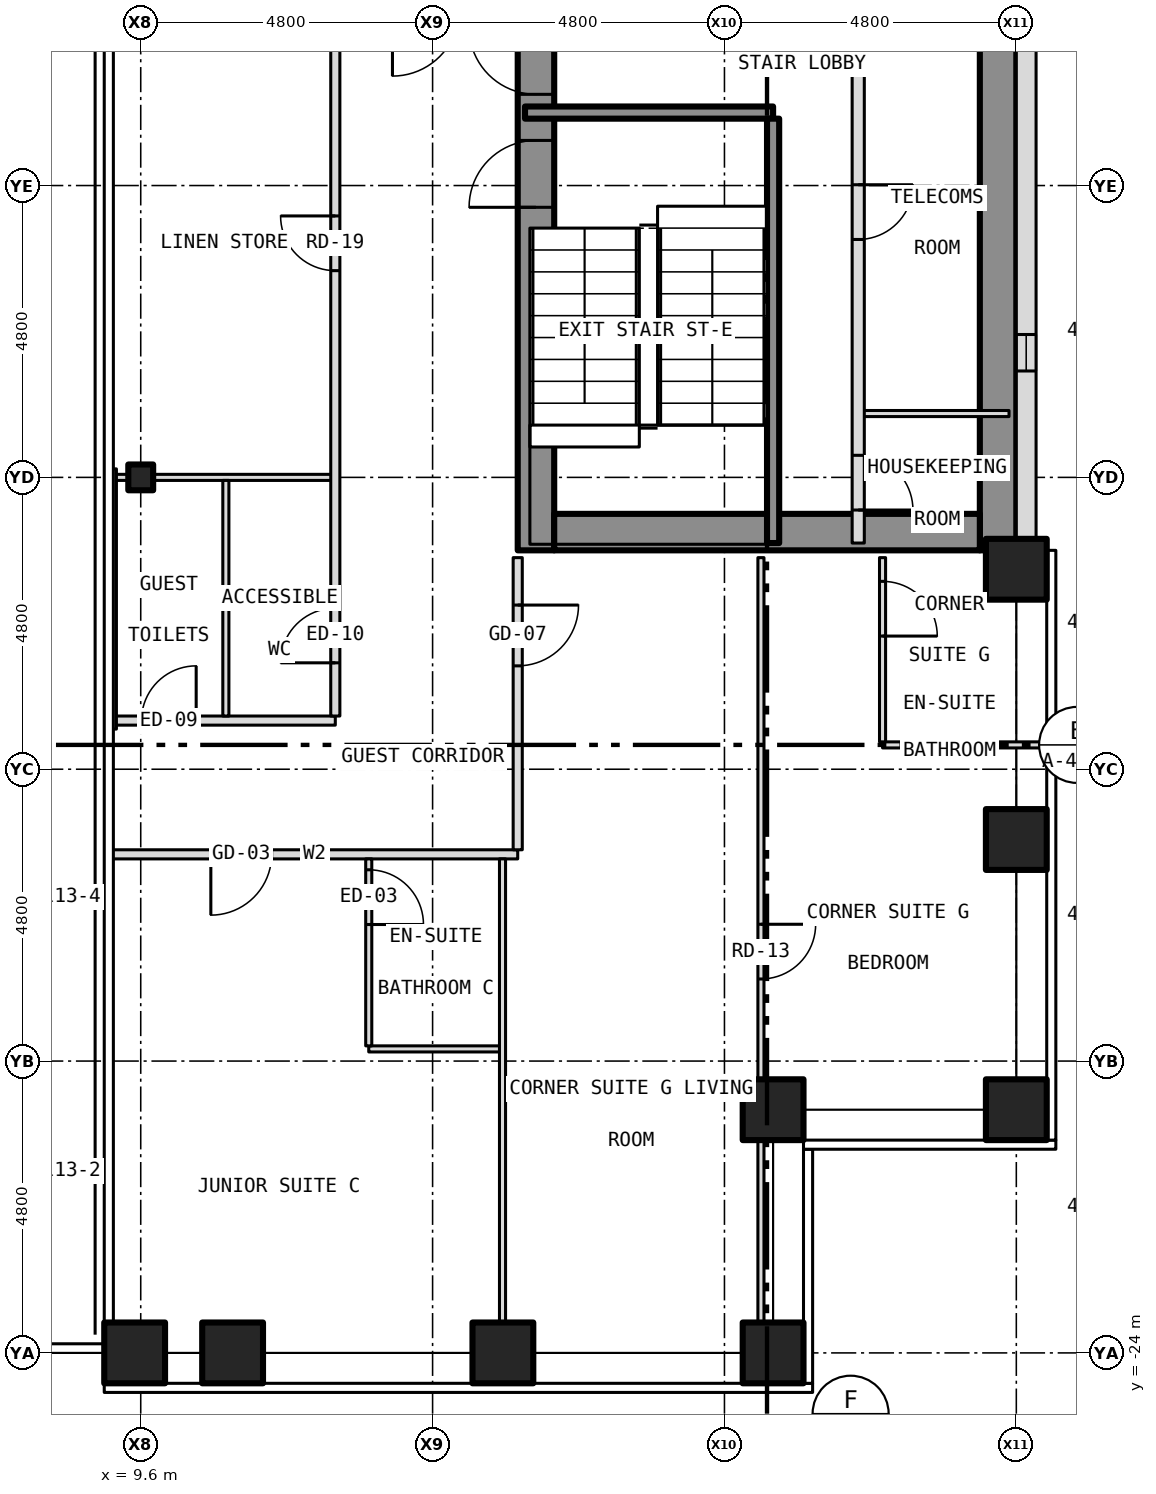
"""IFC4 building model, lengths in metres.
Left out: names, types, materials, properties, quantities, classifications, styles, units other than length and angle.
Written with IfcOpenShell. Run it as: python <this file> out.ifc"""

import sys

from ifc_helpers import new_model, si_unit, direction, frame, frame_2d, origin, origin_2d, place, context, subcontext, project, spatial, rectangle, hollow_rectangle, i_section, extrude, element, fill, save


model = new_model("IFC4")
c1 = context("Model", 3, precision=1e-05, world=origin(), true_north=direction((0.0, 1.0)))
c2 = subcontext(c1, "Body", "Model", "MODEL_VIEW")
j1 = project(units=[si_unit("LENGTHUNIT", "METRE"), si_unit("PLANEANGLEUNIT", "RADIAN")], contexts=[c1])
p1 = place(None, origin())
s1 = spatial("IfcSite", under=j1, at=p1, CompositionType="ELEMENT")
p2 = place(p1, origin())
s2 = spatial("IfcBuilding", under=s1, at=p2, CompositionType="ELEMENT")
p3 = place(p2, frame((0.0, 0.0, 60.0)))
s3 = spatial("IfcBuildingStorey", under=s2, at=p3, CompositionType="ELEMENT", Elevation=60.0)
for number, where, z_axis, x_axis in (
    (1, (11.111, -24.0, -0.15), (0.0, 0.0, 1.0), (1.0, 0.0, 0.0)),
    (2, (15.556, -24.0, -0.15), (0.0, 0.0, 1.0), (1.0, 0.0, 0.0)),
    (3, (20.0, -24.0, -0.15), (0.0, 0.0, 1.0), (1.0, 0.0, 0.0)),
    (4, (24.0, -20.0, -0.15), (0.0, 0.0, 1.0), (1.0, 0.0, 0.0)),
    (5, (24.0, -15.556, -0.15), (0.0, 0.0, 1.0), (1.0, 0.0, 0.0)),
    (6, (24.0, -11.111, -0.15), (0.0, 0.0, 1.0), (1.0, 0.0, 0.0)),
    (7, (20.0, -20.0, -0.15), (0.0, 0.0, 1.0), (1.0, 0.0, 0.0)),
    (8, (9.5, -24.0, -0.15), (0.0, 0.0, 1.0), (1.0, 0.0, 0.0)),
):
    element("IfcColumn", number, at=place(p3, frame(where, z_axis=z_axis, x_axis=x_axis)), inside=s3, PredefinedType="COLUMN", context=c2, shape_type="SweptSolid", body=[
        extrude(hollow_rectangle(XDim=1.0, YDim=1.0, WallThickness=0.06, at=origin_2d()), origin(), (0.0, 0.0, 1.0), 3.5),
    ])
p4 = place(p3, frame((9.6, -9.6, -0.15), z_axis=(0.0, 0.0, 1.0), x_axis=(1.0, 0.0, 0.0)))
e9 = element("IfcColumn", 9, at=p4, inside=s3, PredefinedType="COLUMN", context=c2, shape_type="SweptSolid", body=[
    extrude(i_section(OverallWidth=0.409, OverallDepth=0.424, WebThickness=0.033, FlangeThickness=0.052, at=origin_2d()), origin(), (0.0, 0.0, 1.0), 3.5),
])
p5 = place(p3, frame((16.1, -10.8, 0.0), z_axis=(0.0, 0.0, 1.0), x_axis=(0.0, 1.0, 0.0)))
e10 = element("IfcWall", 10, at=p5, inside=s3, PredefinedType="SHEAR", context=c2, shape_type="SweptSolid", body=[
    extrude(rectangle(XDim=21.6, YDim=0.6, at=frame_2d((10.8, 0.0))), origin(), (0.0, 0.0, 1.0), 3.25),
])
p6 = place(p5, frame((9.4, 0.0, 0.0)))
e11 = element("IfcOpeningElement", 11, at=p6, cuts=e10, PredefinedType="OPENING", context=c2, shape_type="SweptSolid", body=[
    extrude(rectangle(XDim=1.1, YDim=2.1, at=frame_2d((0.55, 1.05))), frame((0.0, 0.312, 0.0), z_axis=(0.0, -1.0, 0.0), x_axis=(1.0, 0.0, 0.0)), (0.0, 0.0, 1.0), 0.624),
])
p7 = place(p5, frame((11.5, 0.0, 0.0)))
e12 = element("IfcOpeningElement", 12, at=p7, cuts=e10, PredefinedType="OPENING", context=c2, shape_type="SweptSolid", body=[
    extrude(rectangle(XDim=1.1, YDim=2.1, at=frame_2d((0.55, 1.05))), frame((0.0, 0.312, 0.0), z_axis=(0.0, -1.0, 0.0), x_axis=(1.0, 0.0, 0.0)), (0.0, 0.0, 1.0), 0.624),
])
p8 = place(p5, frame((13.6, 0.0, 0.0)))
e13 = element("IfcOpeningElement", 13, at=p8, cuts=e10, PredefinedType="OPENING", context=c2, shape_type="SweptSolid", body=[
    extrude(rectangle(XDim=1.1, YDim=2.1, at=frame_2d((0.55, 1.05))), frame((0.0, 0.312, 0.0), z_axis=(0.0, -1.0, 0.0), x_axis=(1.0, 0.0, 0.0)), (0.0, 0.0, 1.0), 0.624),
])
p9 = place(p5, frame((15.7, 0.0, 0.0)))
e14 = element("IfcOpeningElement", 14, at=p9, cuts=e10, PredefinedType="OPENING", context=c2, shape_type="SweptSolid", body=[
    extrude(rectangle(XDim=1.1, YDim=2.1, at=frame_2d((0.55, 1.05))), frame((0.0, 0.312, 0.0), z_axis=(0.0, -1.0, 0.0), x_axis=(1.0, 0.0, 0.0)), (0.0, 0.0, 1.0), 0.624),
])
p10 = place(p5, frame((17.8, 0.0, 0.0)))
e15 = element("IfcOpeningElement", 15, at=p10, cuts=e10, PredefinedType="OPENING", context=c2, shape_type="SweptSolid", body=[
    extrude(rectangle(XDim=1.1, YDim=2.1, at=frame_2d((0.55, 1.05))), frame((0.0, 0.312, 0.0), z_axis=(0.0, -1.0, 0.0), x_axis=(1.0, 0.0, 0.0)), (0.0, 0.0, 1.0), 0.624),
])
p11 = place(p5, frame((5.642, 0.0, 0.0)))
e16 = element("IfcOpeningElement", 16, at=p11, cuts=e10, PredefinedType="OPENING", context=c2, shape_type="SweptSolid", body=[
    extrude(rectangle(XDim=1.1, YDim=2.1, at=frame_2d((0.55, 1.05))), frame((0.0, 0.312, 0.0), z_axis=(0.0, -1.0, 0.0), x_axis=(1.0, 0.0, 0.0)), (0.0, 0.0, 1.0), 0.624),
])
p12 = place(p5, frame((7.5, 0.0, 0.0)))
e17 = element("IfcOpeningElement", 17, at=p12, cuts=e10, PredefinedType="OPENING", context=c2, shape_type="SweptSolid", body=[
    extrude(rectangle(XDim=1.1, YDim=2.1, at=frame_2d((0.55, 1.05))), frame((0.0, 0.312, 0.0), z_axis=(0.0, -1.0, 0.0), x_axis=(1.0, 0.0, 0.0)), (0.0, 0.0, 1.0), 0.624),
])
p13 = place(p3, frame((23.7, -10.8, 0.0), z_axis=(0.0, 0.0, 1.0), x_axis=(0.0, 1.0, 0.0)))
e18 = element("IfcWall", 18, at=p13, inside=s3, PredefinedType="SHEAR", context=c2, shape_type="SweptSolid", body=[
    extrude(rectangle(XDim=21.6, YDim=0.6, at=frame_2d((10.8, 0.0))), origin(), (0.0, 0.0, 1.0), 3.25),
])
p14 = place(p3, frame((16.4, -10.5, 0.0), z_axis=(0.0, 0.0, 1.0), x_axis=(1.0, 0.0, 0.0)))
e19 = element("IfcWall", 19, at=p14, inside=s3, PredefinedType="SHEAR", context=c2, shape_type="SweptSolid", body=[
    extrude(rectangle(XDim=7.0, YDim=0.6, at=frame_2d((3.5, 0.0))), origin(), (0.0, 0.0, 1.0), 3.25),
])
p15 = place(p3, frame((24.163, -10.8, 0.0), z_axis=(0.0, 0.0, 1.0), x_axis=(0.0, 1.0, 0.0)))
e20 = element("IfcWall", 20, at=p15, inside=s3, PredefinedType="SOLIDWALL", context=c2, shape_type="SweptSolid", body=[
    extrude(rectangle(XDim=21.6, YDim=0.325, at=frame_2d((10.8, 0.0))), origin(), (0.0, 0.0, 1.0), 3.5),
])
p16 = place(p15, frame((2.95, 0.0, 1.0)))
e21 = element("IfcOpeningElement", 21, at=p16, cuts=e20, PredefinedType="OPENING", context=c2, shape_type="SweptSolid", body=[
    extrude(rectangle(XDim=0.6, YDim=1.5, at=frame_2d((0.3, 0.75))), frame((0.0, 0.175, 0.0), z_axis=(0.0, -1.0, 0.0), x_axis=(1.0, 0.0, 0.0)), (0.0, 0.0, 1.0), 0.349),
])
p17 = place(p3, frame((13.35, -19.0, 0.0), z_axis=(0.0, 0.0, 1.0), x_axis=(1.0, 0.0, 0.0)))
e22 = element("IfcWall", 22, at=p17, inside=s3, PredefinedType="PARTITIONING", context=c2, shape_type="SweptSolid", body=[
    extrude(rectangle(XDim=2.2, YDim=0.1, at=frame_2d((1.1, 0.0))), origin(), (0.0, 0.0, 1.0), 3.35),
])
p18 = place(p3, frame((9.12, -15.8, 0.0), z_axis=(0.0, 0.0, 1.0), x_axis=(1.0, 0.0, 0.0)))
e23 = element("IfcWall", 23, at=p18, inside=s3, PredefinedType="PARTITIONING", context=c2, shape_type="SweptSolid", body=[
    extrude(rectangle(XDim=6.68, YDim=0.15, at=frame_2d((3.34, 0.0))), origin(), (0.0, 0.0, 1.0), 3.35),
])
p19 = place(p18, frame((1.633, 0.0, 0.0)))
e24 = element("IfcOpeningElement", 24, at=p19, cuts=e23, PredefinedType="OPENING", context=c2, shape_type="SweptSolid", body=[
    extrude(rectangle(XDim=1.0, YDim=2.1, at=frame_2d((0.5, 1.05))), frame((0.0, 0.087, 0.0), z_axis=(0.0, -1.0, 0.0), x_axis=(1.0, 0.0, 0.0)), (0.0, 0.0, 1.0), 0.174),
])
p20 = place(p3, frame((21.8, -14.0, 0.0), z_axis=(0.0, 0.0, 1.0), x_axis=(1.0, 0.0, 0.0)))
e25 = element("IfcWall", 25, at=p20, inside=s3, PredefinedType="PARTITIONING", context=c2, shape_type="SweptSolid", body=[
    extrude(rectangle(XDim=2.73, YDim=0.1, at=frame_2d((1.365, 0.0))), origin(), (0.0, 0.0, 1.0), 3.35),
])
p21 = place(p3, frame((9.15, -13.6, 0.0), z_axis=(0.0, 0.0, 1.0), x_axis=(1.0, 0.0, 0.0)))
e26 = element("IfcWall", 26, at=p21, inside=s3, PredefinedType="PARTITIONING", context=c2, shape_type="SweptSolid", body=[
    extrude(rectangle(XDim=3.65, YDim=0.15, at=frame_2d((1.825, 0.0))), origin(), (0.0, 0.0, 1.0), 3.35),
])
p22 = place(p21, frame((0.462, 0.0, 0.0)))
e27 = element("IfcOpeningElement", 27, at=p22, cuts=e26, PredefinedType="OPENING", context=c2, shape_type="SweptSolid", body=[
    extrude(rectangle(XDim=0.9, YDim=2.1, at=frame_2d((0.45, 1.05))), frame((0.0, 0.087, 0.0), z_axis=(0.0, -1.0, 0.0), x_axis=(1.0, 0.0, 0.0)), (0.0, 0.0, 1.0), 0.174),
])
p23 = place(p3, frame((9.15, -9.6, 0.0), z_axis=(0.0, 0.0, 1.0), x_axis=(1.0, 0.0, 0.0)))
e28 = element("IfcWall", 28, at=p23, inside=s3, PredefinedType="PARTITIONING", context=c2, shape_type="SweptSolid", body=[
    extrude(rectangle(XDim=0.654, YDim=0.1, at=frame_2d((0.327, 0.0))), origin(), (0.0, 0.0, 1.0), 3.35),
])
p24 = place(p3, frame((9.804, -9.6, 0.0), z_axis=(0.0, 0.0, 1.0), x_axis=(1.0, 0.0, 0.0)))
e29 = element("IfcWall", 29, at=p24, inside=s3, PredefinedType="PARTITIONING", context=c2, shape_type="SweptSolid", body=[
    extrude(rectangle(XDim=2.996, YDim=0.1, at=frame_2d((1.498, 0.0))), origin(), (0.0, 0.0, 1.0), 2.728),
])
p25 = place(p3, frame((21.4, -8.55, 0.0), z_axis=(0.0, 0.0, 1.0), x_axis=(1.0, 0.0, 0.0)))
e30 = element("IfcWall", 30, at=p25, inside=s3, PredefinedType="PARTITIONING", context=c2, shape_type="SweptSolid", body=[
    extrude(rectangle(XDim=2.48, YDim=0.1, at=frame_2d((1.24, 0.0))), origin(), (0.0, 0.0, 1.0), 3.25),
])
p26 = place(p3, frame((15.92, -3.6, 0.0), z_axis=(0.0, 0.0, 1.0), x_axis=(1.0, 0.0, 0.0)))
e31 = element("IfcWall", 31, at=p26, inside=s3, PredefinedType="SHEAR", context=c2, shape_type="SweptSolid", body=[
    extrude(rectangle(XDim=4.08, YDim=0.2, at=frame_2d((2.04, 0.0))), origin(), (0.0, 0.0, 1.0), 3.25),
])
p27 = place(p3, frame((9.15, -13.74, 0.0), z_axis=(0.0, 0.0, 1.0), x_axis=(0.0, 1.0, 0.0)))
e32 = element("IfcWall", 32, at=p27, inside=s3, PredefinedType="PARTITIONING", context=c2, shape_type="SweptSolid", body=[
    extrude(rectangle(XDim=4.28, YDim=0.1, at=frame_2d((2.14, 0.0))), origin(), (0.0, 0.0, 1.0), 2.733),
])
p28 = place(p3, frame((11.0, -13.525, 0.0), z_axis=(0.0, 0.0, 1.0), x_axis=(0.0, 1.0, 0.0)))
e33 = element("IfcWall", 33, at=p28, inside=s3, PredefinedType="PARTITIONING", context=c2, shape_type="SweptSolid", body=[
    extrude(rectangle(XDim=3.875, YDim=0.1, at=frame_2d((1.938, 0.0))), origin(), (0.0, 0.0, 1.0), 3.35),
])
p29 = place(p3, frame((12.8, -13.525, 0.0), z_axis=(0.0, 0.0, 1.0), x_axis=(0.0, 1.0, 0.0)))
e34 = element("IfcWall", 34, at=p29, inside=s3, PredefinedType="PARTITIONING", context=c2, shape_type="SweptSolid", body=[
    extrude(rectangle(XDim=11.525, YDim=0.15, at=frame_2d((5.762, 0.0))), origin(), (0.0, 0.0, 1.0), 3.35),
])
p30 = place(p29, frame((0.875, 0.0, 0.0)))
e35 = element("IfcOpeningElement", 35, at=p30, cuts=e34, PredefinedType="OPENING", context=c2, shape_type="SweptSolid", body=[
    extrude(rectangle(XDim=0.9, YDim=2.1, at=frame_2d((0.45, 1.05))), frame((0.0, 0.087, 0.0), z_axis=(0.0, -1.0, 0.0), x_axis=(1.0, 0.0, 0.0)), (0.0, 0.0, 1.0), 0.174),
])
p31 = place(p29, frame((7.325, 0.0, 0.0)))
e36 = element("IfcOpeningElement", 36, at=p31, cuts=e34, PredefinedType="OPENING", context=c2, shape_type="SweptSolid", body=[
    extrude(rectangle(XDim=0.9, YDim=2.1, at=frame_2d((0.45, 1.05))), frame((0.0, 0.087, 0.0), z_axis=(0.0, -1.0, 0.0), x_axis=(1.0, 0.0, 0.0)), (0.0, 0.0, 1.0), 0.174),
])
p32 = place(p3, frame((13.35, -18.95, 0.0), z_axis=(0.0, 0.0, 1.0), x_axis=(0.0, 1.0, 0.0)))
e37 = element("IfcWall", 37, at=p32, inside=s3, PredefinedType="PARTITIONING", context=c2, shape_type="SweptSolid", body=[
    extrude(rectangle(XDim=3.075, YDim=0.1, at=frame_2d((1.538, 0.0))), origin(), (0.0, 0.0, 1.0), 3.35),
])
p33 = place(p32, frame((1.996, 0.0, 0.0)))
e38 = element("IfcOpeningElement", 38, at=p33, cuts=e37, PredefinedType="OPENING", context=c2, shape_type="SweptSolid", body=[
    extrude(rectangle(XDim=0.9, YDim=2.1, at=frame_2d((0.45, 1.05))), frame((0.0, 0.062, 0.0), z_axis=(0.0, -1.0, 0.0), x_axis=(1.0, 0.0, 0.0)), (0.0, 0.0, 1.0), 0.124),
])
p34 = place(p3, frame((15.55, -23.88, 0.0), z_axis=(0.0, 0.0, 1.0), x_axis=(0.0, 1.0, 0.0)))
e39 = element("IfcWall", 39, at=p34, inside=s3, PredefinedType="PARTITIONING", context=c2, shape_type="SweptSolid", body=[
    extrude(rectangle(XDim=8.005, YDim=0.1, at=frame_2d((4.002, 0.0))), origin(), (0.0, 0.0, 1.0), 3.35),
])
p35 = place(p3, frame((15.8, -15.725, 0.0), z_axis=(0.0, 0.0, 1.0), x_axis=(0.0, 1.0, 0.0)))
e40 = element("IfcWall", 40, at=p35, inside=s3, PredefinedType="PARTITIONING", context=c2, shape_type="SweptSolid", body=[
    extrude(rectangle(XDim=4.805, YDim=0.15, at=frame_2d((2.403, 0.0))), origin(), (0.0, 0.0, 1.0), 3.35),
])
p36 = place(p35, frame((3.025, 0.0, 0.0)))
e41 = element("IfcOpeningElement", 41, at=p36, cuts=e40, PredefinedType="OPENING", context=c2, shape_type="SweptSolid", body=[
    extrude(rectangle(XDim=1.0, YDim=2.1, at=frame_2d((0.5, 1.05))), frame((0.0, 0.087, 0.0), z_axis=(0.0, -1.0, 0.0), x_axis=(1.0, 0.0, 0.0)), (0.0, 0.0, 1.0), 0.174),
])
p37 = place(p3, frame((19.8, -23.88, 0.0), z_axis=(0.0, 0.0, 1.0), x_axis=(0.0, 1.0, 0.0)))
e42 = element("IfcWall", 42, at=p37, inside=s3, PredefinedType="PARTITIONING", context=c2, shape_type="SweptSolid", body=[
    extrude(rectangle(XDim=12.96, YDim=0.1, at=frame_2d((6.48, 0.0))), origin(), (0.0, 0.0, 1.0), 3.35),
])
p38 = place(p37, frame((6.03, 0.0, 0.0)))
e43 = element("IfcOpeningElement", 43, at=p38, cuts=e42, PredefinedType="OPENING", context=c2, shape_type="SweptSolid", body=[
    extrude(rectangle(XDim=0.9, YDim=2.1, at=frame_2d((0.45, 1.05))), frame((0.0, 0.062, 0.0), z_axis=(0.0, -1.0, 0.0), x_axis=(1.0, 0.0, 0.0)), (0.0, 0.0, 1.0), 0.124),
])
p39 = place(p3, frame((20.0, -10.68, 0.0), z_axis=(0.0, 0.0, 1.0), x_axis=(0.0, 1.0, 0.0)))
e44 = element("IfcWall", 44, at=p39, inside=s3, PredefinedType="SHEAR", context=c2, shape_type="SweptSolid", body=[
    extrude(rectangle(XDim=6.98, YDim=0.2, at=frame_2d((3.49, 0.0))), origin(), (0.0, 0.0, 1.0), 3.25),
])
p40 = place(p3, frame((21.4, -10.68, 0.0), z_axis=(0.0, 0.0, 1.0), x_axis=(0.0, 1.0, 0.0)))
e45 = element("IfcWall", 45, at=p40, inside=s3, PredefinedType="PARTITIONING", context=c2, shape_type="SweptSolid", body=[
    extrude(rectangle(XDim=8.68, YDim=0.2, at=frame_2d((4.34, 0.0))), origin(), (0.0, 0.0, 1.0), 3.25),
])
p41 = place(p40, frame((0.543, 0.0, 0.0)))
e46 = element("IfcOpeningElement", 46, at=p41, cuts=e45, PredefinedType="OPENING", context=c2, shape_type="SweptSolid", body=[
    extrude(rectangle(XDim=0.9, YDim=2.1, at=frame_2d((0.45, 1.05))), frame((0.0, 0.112, 0.0), z_axis=(0.0, -1.0, 0.0), x_axis=(1.0, 0.0, 0.0)), (0.0, 0.0, 1.0), 0.224),
])
p42 = place(p40, frame((4.993, 0.0, 0.0)))
e47 = element("IfcOpeningElement", 47, at=p42, cuts=e45, PredefinedType="OPENING", context=c2, shape_type="SweptSolid", body=[
    extrude(rectangle(XDim=0.9, YDim=2.1, at=frame_2d((0.45, 1.05))), frame((0.0, 0.112, 0.0), z_axis=(0.0, -1.0, 0.0), x_axis=(1.0, 0.0, 0.0)), (0.0, 0.0, 1.0), 0.224),
])
p43 = place(p3, frame((21.8, -13.95, 0.0), z_axis=(0.0, 0.0, 1.0), x_axis=(0.0, 1.0, 0.0)))
e48 = element("IfcWall", 48, at=p43, inside=s3, PredefinedType="PARTITIONING", context=c2, shape_type="SweptSolid", body=[
    extrude(rectangle(XDim=3.03, YDim=0.1, at=frame_2d((1.515, 0.0))), origin(), (0.0, 0.0, 1.0), 3.35),
])
p44 = place(p43, frame((1.74, 0.0, 0.0)))
e49 = element("IfcOpeningElement", 49, at=p44, cuts=e48, PredefinedType="OPENING", context=c2, shape_type="SweptSolid", body=[
    extrude(rectangle(XDim=0.9, YDim=2.1, at=frame_2d((0.45, 1.05))), frame((0.0, 0.062, 0.0), z_axis=(0.0, -1.0, 0.0), x_axis=(1.0, 0.0, 0.0)), (0.0, 0.0, 1.0), 0.124),
])
p45 = place(p16, origin())
e50 = element("IfcWindow", 50, at=p45, inside=s3, PartitioningType="SINGLE_PANEL", PredefinedType="WINDOW", context=c2, shape_type="SweptSolid", body=[
    extrude(rectangle(XDim=0.6, YDim=1.5, at=frame_2d((0.3, 0.75))), frame((0.0, -0.073, 0.0), z_axis=(0.0, -1.0, 0.0), x_axis=(1.0, 0.0, 0.0)), (0.0, 0.0, 1.0), 0.06),
])
fill(e21, e50)
p46 = place(p11, origin())
e51 = element("IfcDoor", 51, at=p46, inside=s3, OperationType="SINGLE_SWING_LEFT", PredefinedType="DOOR", context=c2, shape_type="SweptSolid", body=[
    extrude(rectangle(XDim=1.1, YDim=2.1, at=frame_2d((0.55, 1.05))), frame((0.0, 0.025, 0.0), z_axis=(0.0, -1.0, 0.0), x_axis=(1.0, 0.0, 0.0)), (0.0, 0.0, 1.0), 0.05),
])
fill(e16, e51)
p47 = place(p12, origin())
e52 = element("IfcDoor", 52, at=p47, inside=s3, OperationType="SINGLE_SWING_RIGHT", PredefinedType="DOOR", context=c2, shape_type="SweptSolid", body=[
    extrude(rectangle(XDim=1.1, YDim=2.1, at=frame_2d((0.55, 1.05))), frame((0.0, 0.025, 0.0), z_axis=(0.0, -1.0, 0.0), x_axis=(1.0, 0.0, 0.0)), (0.0, 0.0, 1.0), 0.05),
])
fill(e17, e52)
p48 = place(p41, origin())
e53 = element("IfcDoor", 53, at=p48, inside=s3, OperationType="SINGLE_SWING_LEFT", PredefinedType="DOOR", context=c2, shape_type="SweptSolid", body=[
    extrude(rectangle(XDim=0.9, YDim=2.1, at=frame_2d((0.45, 1.05))), frame((0.0, 0.025, 0.0), z_axis=(0.0, -1.0, 0.0), x_axis=(1.0, 0.0, 0.0)), (0.0, 0.0, 1.0), 0.05),
])
fill(e46, e53)
p49 = place(p42, origin())
e54 = element("IfcDoor", 54, at=p49, inside=s3, OperationType="SINGLE_SWING_RIGHT", PredefinedType="DOOR", context=c2, shape_type="SweptSolid", body=[
    extrude(rectangle(XDim=0.9, YDim=2.1, at=frame_2d((0.45, 1.05))), frame((0.0, 0.025, 0.0), z_axis=(0.0, -1.0, 0.0), x_axis=(1.0, 0.0, 0.0)), (0.0, 0.0, 1.0), 0.05),
])
fill(e47, e54)
p50 = place(p19, origin())
e55 = element("IfcDoor", 55, at=p50, inside=s3, OperationType="SINGLE_SWING_LEFT", PredefinedType="DOOR", context=c2, shape_type="SweptSolid", body=[
    extrude(rectangle(XDim=1.0, YDim=2.1, at=frame_2d((0.5, 1.05))), frame((0.0, 0.025, 0.0), z_axis=(0.0, -1.0, 0.0), x_axis=(1.0, 0.0, 0.0)), (0.0, 0.0, 1.0), 0.05),
])
fill(e24, e55)
p51 = place(p33, origin())
e56 = element("IfcDoor", 56, at=p51, inside=s3, OperationType="SINGLE_SWING_LEFT", PredefinedType="DOOR", context=c2, shape_type="SweptSolid", body=[
    extrude(rectangle(XDim=0.9, YDim=2.1, at=frame_2d((0.45, 1.05))), frame((0.0, 0.025, 0.0), z_axis=(0.0, -1.0, 0.0), x_axis=(1.0, 0.0, 0.0)), (0.0, 0.0, 1.0), 0.05),
])
fill(e38, e56)
p52 = place(p36, origin())
e57 = element("IfcDoor", 57, at=p52, inside=s3, OperationType="SINGLE_SWING_RIGHT", PredefinedType="DOOR", context=c2, shape_type="SweptSolid", body=[
    extrude(rectangle(XDim=1.0, YDim=2.1, at=frame_2d((0.5, 1.05))), frame((0.0, 0.025, 0.0), z_axis=(0.0, -1.0, 0.0), x_axis=(1.0, 0.0, 0.0)), (0.0, 0.0, 1.0), 0.05),
])
fill(e41, e57)
p53 = place(p38, origin())
e58 = element("IfcDoor", 58, at=p53, inside=s3, OperationType="SINGLE_SWING_RIGHT", PredefinedType="DOOR", context=c2, shape_type="SweptSolid", body=[
    extrude(rectangle(XDim=0.9, YDim=2.1, at=frame_2d((0.45, 1.05))), frame((0.0, 0.025, 0.0), z_axis=(0.0, -1.0, 0.0), x_axis=(1.0, 0.0, 0.0)), (0.0, 0.0, 1.0), 0.05),
])
fill(e43, e58)
p54 = place(p44, origin())
e59 = element("IfcDoor", 59, at=p54, inside=s3, OperationType="SINGLE_SWING_LEFT", PredefinedType="DOOR", context=c2, shape_type="SweptSolid", body=[
    extrude(rectangle(XDim=0.9, YDim=2.1, at=frame_2d((0.45, 1.05))), frame((0.0, 0.025, 0.0), z_axis=(0.0, -1.0, 0.0), x_axis=(1.0, 0.0, 0.0)), (0.0, 0.0, 1.0), 0.05),
])
fill(e49, e59)
p55 = place(p22, origin())
e60 = element("IfcDoor", 60, at=p55, inside=s3, OperationType="SINGLE_SWING_RIGHT", PredefinedType="DOOR", context=c2, shape_type="SweptSolid", body=[
    extrude(rectangle(XDim=0.9, YDim=2.1, at=frame_2d((0.45, 1.05))), frame((0.0, 0.025, 0.0), z_axis=(0.0, -1.0, 0.0), x_axis=(1.0, 0.0, 0.0)), (0.0, 0.0, 1.0), 0.05),
])
fill(e27, e60)
p56 = place(p30, origin())
e61 = element("IfcDoor", 61, at=p56, inside=s3, OperationType="SINGLE_SWING_LEFT", PredefinedType="DOOR", context=c2, shape_type="SweptSolid", body=[
    extrude(rectangle(XDim=0.9, YDim=2.1, at=frame_2d((0.45, 1.05))), frame((0.0, 0.025, 0.0), z_axis=(0.0, -1.0, 0.0), x_axis=(1.0, 0.0, 0.0)), (0.0, 0.0, 1.0), 0.05),
])
fill(e35, e61)
p57 = place(p31, origin())
e62 = element("IfcDoor", 62, at=p57, inside=s3, OperationType="SINGLE_SWING_RIGHT", PredefinedType="DOOR", context=c2, shape_type="SweptSolid", body=[
    extrude(rectangle(XDim=0.9, YDim=2.1, at=frame_2d((0.45, 1.05))), frame((0.0, 0.025, 0.0), z_axis=(0.0, -1.0, 0.0), x_axis=(1.0, 0.0, 0.0)), (0.0, 0.0, 1.0), 0.05),
])
fill(e36, e62)
save(model, sys.argv[1])
